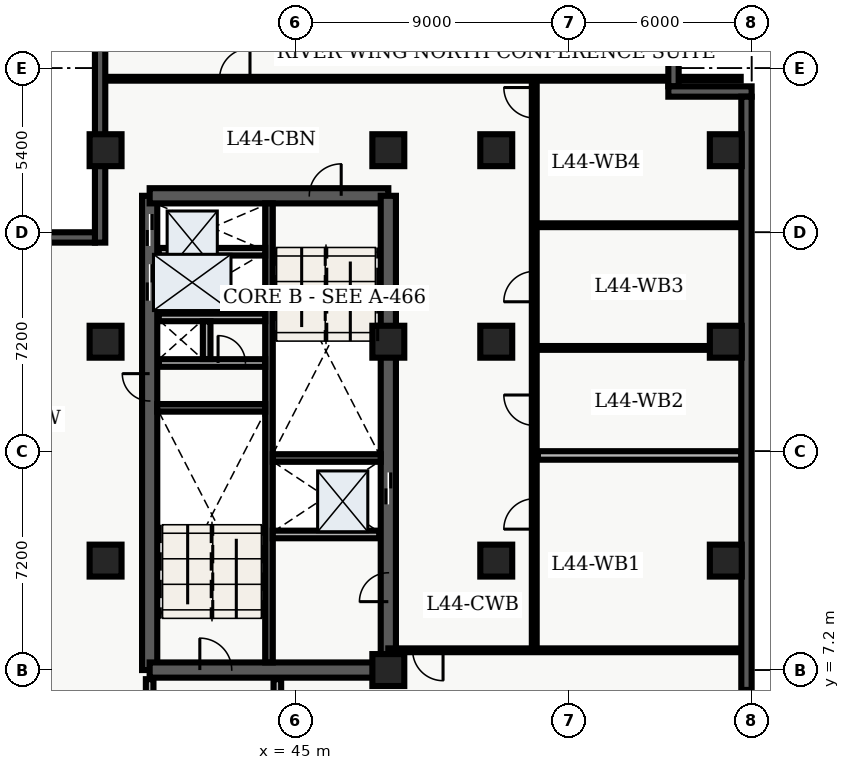
"""IFC4 building model, lengths in metres.
Left out: names, types, materials, properties, quantities, classifications, styles, units other than length and angle.
Written with IfcOpenShell. Run it as: python <this file> out.ifc"""

import sys

from ifc_helpers import new_model, entity, si_unit, converted_unit, direction, frame, origin_with_axes, origin_2d_with_axis, place, context, subcontext, project, spatial, polyline, rectangle, outline, extrude, element, fill, save


model = new_model("IFC4")
c1 = context("Model", 3, precision=1e-05, world=origin_with_axes(), true_north=direction((0.0, 1.0)))
c2 = subcontext(c1, "Body", "Model", "MODEL_VIEW")
j1 = project(units=[si_unit("LENGTHUNIT", "METRE"), converted_unit("PLANEANGLEUNIT", "DEGREE", entity("IfcPlaneAngleMeasure", 0.017), si_unit("PLANEANGLEUNIT", "RADIAN"), dimensions=[0, 0, 0, 0, 0, 0, 0])], contexts=[c1])
p1 = place(None, origin_with_axes())
s1 = spatial("IfcSite", under=j1, at=p1, CompositionType="ELEMENT")
p2 = place(p1, origin_with_axes())
s2 = spatial("IfcBuilding", under=s1, at=p2, CompositionType="ELEMENT")
p3 = place(p2, frame((0.0, 0.0, 179.7), z_axis=(0.0, 0.0, 1.0), x_axis=(1.0, 0.0, 0.0)))
s3 = spatial("IfcBuildingStorey", under=s2, at=p3, CompositionType="ELEMENT", Elevation=179.7)
p4 = place(p3, frame((40.2, 7.2, 0.0), z_axis=(0.0, 0.0, 1.0), x_axis=(0.0, 1.0, 0.0)))
e1 = element("IfcWall", 1, at=p4, inside=s3, PredefinedType="SHEAR", context=c2, shape_type="SweptSolid", body=[
    extrude(outline(polyline([(0.0, -0.25), (15.6, -0.25), (15.6, 0.25), (0.0, 0.25), (0.0, -0.25)])), origin_with_axes(), (0.0, 0.0, 1.0), 3.66),
])
p5 = place(p4, frame((14.475, 0.0, 0.0), z_axis=(0.0, 0.0, 1.0), x_axis=(1.0, 0.0, 0.0)))
e2 = element("IfcOpeningElement", 2, at=p5, cuts=e1, PredefinedType="OPENING", context=c2, shape_type="SweptSolid", body=[
    extrude(rectangle(XDim=1.05, YDim=0.52, at=origin_2d_with_axis()), origin_with_axes(), (0.0, 0.0, 1.0), 2.15),
])
p6 = place(p4, frame((12.75, 0.0, 0.0), z_axis=(0.0, 0.0, 1.0), x_axis=(1.0, 0.0, 0.0)))
e3 = element("IfcOpeningElement", 3, at=p6, cuts=e1, PredefinedType="OPENING", context=c2, shape_type="SweptSolid", body=[
    extrude(rectangle(XDim=1.2, YDim=0.52, at=origin_2d_with_axis()), origin_with_axes(), (0.0, 0.0, 1.0), 2.15),
])
p7 = place(p4, frame((9.3, 0.0, 0.0), z_axis=(0.0, 0.0, 1.0), x_axis=(1.0, 0.0, 0.0)))
e4 = element("IfcOpeningElement", 4, at=p7, cuts=e1, PredefinedType="OPENING", context=c2, shape_type="SweptSolid", body=[
    extrude(rectangle(XDim=0.9, YDim=0.52, at=origin_2d_with_axis()), origin_with_axes(), (0.0, 0.0, 1.0), 2.15),
])
p8 = place(p3, frame((40.2, 7.2, 0.0), z_axis=(0.0, 0.0, 1.0), x_axis=(1.0, 0.0, 0.0)))
e5 = element("IfcWall", 5, at=p8, inside=s3, PredefinedType="SHEAR", context=c2, shape_type="SweptSolid", body=[
    extrude(outline(polyline([(0.0, -0.25), (7.85, -0.25), (7.85, 0.25), (0.0, 0.25), (0.0, -0.25)])), origin_with_axes(), (0.0, 0.0, 1.0), 3.66),
])
p9 = place(p8, frame((2.175, 0.0, 0.0), z_axis=(0.0, 0.0, 1.0), x_axis=(1.0, 0.0, 0.0)))
e6 = element("IfcOpeningElement", 6, at=p9, cuts=e5, PredefinedType="OPENING", context=c2, shape_type="SweptSolid", body=[
    extrude(rectangle(XDim=1.05, YDim=0.52, at=origin_2d_with_axis()), origin_with_axes(), (0.0, 0.0, 1.0), 2.15),
])
p10 = place(p3, frame((40.2, 22.8, 0.0), z_axis=(0.0, 0.0, 1.0), x_axis=(1.0, 0.0, 0.0)))
e7 = element("IfcWall", 7, at=p10, inside=s3, PredefinedType="SHEAR", context=c2, shape_type="SweptSolid", body=[
    extrude(outline(polyline([(0.0, -0.25), (7.85, -0.25), (7.85, 0.25), (0.0, 0.25), (0.0, -0.25)])), origin_with_axes(), (0.0, 0.0, 1.0), 3.66),
])
p11 = place(p10, frame((5.775, 0.0, 0.0), z_axis=(0.0, 0.0, 1.0), x_axis=(1.0, 0.0, 0.0)))
e8 = element("IfcOpeningElement", 8, at=p11, cuts=e7, PredefinedType="OPENING", context=c2, shape_type="SweptSolid", body=[
    extrude(rectangle(XDim=1.05, YDim=0.52, at=origin_2d_with_axis()), origin_with_axes(), (0.0, 0.0, 1.0), 2.15),
])
p12 = place(p3, frame((48.05, 7.2, 0.0), z_axis=(0.0, 0.0, 1.0), x_axis=(0.0, 1.0, 0.0)))
e9 = element("IfcWall", 9, at=p12, inside=s3, PredefinedType="SHEAR", context=c2, shape_type="SweptSolid", body=[
    extrude(outline(polyline([(0.0, -0.25), (15.6, -0.25), (15.6, 0.25), (0.0, 0.25), (0.0, -0.25)])), origin_with_axes(), (0.0, 0.0, 1.0), 3.66),
])
p13 = place(p12, frame((5.975, 0.0, 0.0), z_axis=(0.0, 0.0, 1.0), x_axis=(1.0, 0.0, 0.0)))
e10 = element("IfcOpeningElement", 10, at=p13, cuts=e9, PredefinedType="OPENING", context=c2, shape_type="SweptSolid", body=[
    extrude(rectangle(XDim=1.05, YDim=0.52, at=origin_2d_with_axis()), origin_with_axes(), (0.0, 0.0, 1.0), 2.15),
])
p14 = place(p12, frame((2.725, 0.0, 0.0), z_axis=(0.0, 0.0, 1.0), x_axis=(1.0, 0.0, 0.0)))
e11 = element("IfcOpeningElement", 11, at=p14, cuts=e9, PredefinedType="OPENING", context=c2, shape_type="SweptSolid", body=[
    extrude(rectangle(XDim=0.95, YDim=0.52, at=origin_2d_with_axis()), origin_with_axes(), (0.0, 0.0, 1.0), 2.15),
])
p15 = place(p3, frame((44.125, 7.45, 0.0), z_axis=(0.0, 0.0, 1.0), x_axis=(0.0, 1.0, 0.0)))
e12 = element("IfcWall", 12, at=p15, inside=s3, PredefinedType="SHEAR", context=c2, shape_type="SweptSolid", body=[
    extrude(outline(polyline([(0.0, -0.125), (15.1, -0.125), (15.1, 0.125), (0.0, 0.125), (0.0, -0.125)])), origin_with_axes(), (0.0, 0.0, 1.0), 3.66),
])
for number, where, z_axis, x_axis in (
    (13, (40.45, 15.825, 0.0), (0.0, 0.0, 1.0), (1.0, 0.0, 0.0)),
    (14, (44.25, 14.175, 0.0), (0.0, 0.0, 1.0), (1.0, 0.0, 0.0)),
):
    element("IfcWall", number, at=place(p3, frame(where, z_axis=z_axis, x_axis=x_axis)), inside=s3, PredefinedType="SHEAR", context=c2, shape_type="SweptSolid", body=[
        extrude(outline(polyline([(0.0, -0.125), (3.55, -0.125), (3.55, 0.125), (0.0, 0.125), (0.0, -0.125)])), origin_with_axes(), (0.0, 0.0, 1.0), 3.66),
    ])
p16 = place(p3, frame((40.5, 17.3, 0.0), z_axis=(0.0, 0.0, 1.0), x_axis=(1.0, 0.0, 0.0)))
e15 = element("IfcWall", 15, at=p16, inside=s3, PredefinedType="SOLIDWALL", context=c2, shape_type="SweptSolid", body=[
    extrude(outline(polyline([(0.0, -0.125), (3.5, -0.125), (3.5, 0.125), (0.0, 0.125), (0.0, -0.125)])), origin_with_axes(), (0.0, 0.0, 1.0), 2.7),
])
p17 = place(p16, frame((2.4, 0.0, 0.0), z_axis=(0.0, 0.0, 1.0), x_axis=(1.0, 0.0, 0.0)))
e16 = element("IfcOpeningElement", 16, at=p17, cuts=e15, PredefinedType="OPENING", context=c2, shape_type="SweptSolid", body=[
    extrude(rectangle(XDim=0.9, YDim=0.27, at=origin_2d_with_axis()), origin_with_axes(), (0.0, 0.0, 1.0), 2.15),
])
p18 = place(p3, frame((40.5, 18.8, 0.0), z_axis=(0.0, 0.0, 1.0), x_axis=(1.0, 0.0, 0.0)))
e17 = element("IfcWall", 17, at=p18, inside=s3, PredefinedType="SOLIDWALL", context=c2, shape_type="SweptSolid", body=[
    extrude(outline(polyline([(0.0, -0.125), (3.5, -0.125), (3.5, 0.125), (0.0, 0.125), (0.0, -0.125)])), origin_with_axes(), (0.0, 0.0, 1.0), 2.7),
])
p19 = place(p3, frame((42.075, 17.43, 0.0), z_axis=(0.0, 0.0, 1.0), x_axis=(0.0, 1.0, 0.0)))
e18 = element("IfcWall", 18, at=p19, inside=s3, PredefinedType="SOLIDWALL", context=c2, shape_type="SweptSolid", body=[
    extrude(outline(polyline([(0.0, -0.125), (1.24, -0.125), (1.24, 0.125), (0.0, 0.125), (0.0, -0.125)])), origin_with_axes(), (0.0, 0.0, 1.0), 2.7),
])
p20 = place(p3, frame((40.2, 3.1, 0.0), z_axis=(0.0, 0.0, 1.0), x_axis=(0.0, 1.0, 0.0)))
e19 = element("IfcWall", 19, at=p20, inside=s3, PredefinedType="SOLIDWALL", context=c2, shape_type="SweptSolid", body=[
    extrude(outline(polyline([(0.0, -0.125), (3.8, -0.125), (3.8, 0.125), (0.0, 0.125), (0.0, -0.125)])), origin_with_axes(), (0.0, 0.0, 1.0), 2.7),
])
p21 = place(p20, frame((2.075, 0.0, 0.0), z_axis=(0.0, 0.0, 1.0), x_axis=(1.0, 0.0, 0.0)))
e20 = element("IfcOpeningElement", 20, at=p21, cuts=e19, PredefinedType="OPENING", context=c2, shape_type="SweptSolid", body=[
    extrude(rectangle(XDim=1.05, YDim=0.27, at=origin_2d_with_axis()), origin_with_axes(), (0.0, 0.0, 1.0), 2.15),
])
p22 = place(p3, frame((44.4, 3.1, 0.0), z_axis=(0.0, 0.0, 1.0), x_axis=(0.0, 1.0, 0.0)))
e21 = element("IfcWall", 21, at=p22, inside=s3, PredefinedType="SOLIDWALL", context=c2, shape_type="SweptSolid", body=[
    extrude(outline(polyline([(0.0, -0.125), (3.8, -0.125), (3.8, 0.125), (0.0, 0.125), (0.0, -0.125)])), origin_with_axes(), (0.0, 0.0, 1.0), 2.7),
])
for number, where, z_axis, x_axis in (
    (22, (38.75, 10.8, 0.0), (0.0, 0.0, 1.0), (1.0, 0.0, 0.0)),
    (23, (38.75, 18.0, 0.0), (0.0, 0.0, 1.0), (1.0, 0.0, 0.0)),
    (24, (38.75, 24.3, 0.0), (0.0, 0.0, 1.0), (1.0, 0.0, 0.0)),
    (25, (48.05, 7.2, 0.0), (0.0, 0.0, 1.0), (1.0, 0.0, 0.0)),
    (26, (48.05, 18.0, 0.0), (0.0, 0.0, 1.0), (1.0, 0.0, 0.0)),
    (27, (48.05, 24.3, 0.0), (0.0, 0.0, 1.0), (1.0, 0.0, 0.0)),
    (28, (51.6, 10.8, 0.0), (0.0, 0.0, 1.0), (1.0, 0.0, 0.0)),
    (29, (51.6, 18.0, 0.0), (0.0, 0.0, 1.0), (1.0, 0.0, 0.0)),
    (30, (51.6, 24.3, 0.0), (0.0, 0.0, 1.0), (1.0, 0.0, 0.0)),
    (31, (59.15, 10.8, 0.0), (0.0, 0.0, 1.0), (1.0, 0.0, 0.0)),
    (32, (59.15, 18.0, 0.0), (0.0, 0.0, 1.0), (1.0, 0.0, 0.0)),
    (33, (59.15, 24.3, 0.0), (0.0, 0.0, 1.0), (1.0, 0.0, 0.0)),
):
    element("IfcColumn", number, at=place(p3, frame(where, z_axis=z_axis, x_axis=x_axis)), inside=s3, PredefinedType="COLUMN", context=c2, shape_type="SweptSolid", body=[
        extrude(rectangle(XDim=1.05, YDim=1.05, at=origin_2d_with_axis()), origin_with_axes(), (0.0, 0.0, 1.0), 3.9),
    ])
for number, where, z_axis, x_axis in (
    (34, (40.5, 20.96, 0.0), (0.0, 0.0, 1.0), (1.0, 0.0, 0.0)),
    (35, (44.25, 11.66, 0.0), (0.0, 0.0, 1.0), (1.0, 0.0, 0.0)),
):
    element("IfcWall", number, at=place(p3, frame(where, z_axis=z_axis, x_axis=x_axis)), inside=s3, PredefinedType="SOLIDWALL", context=c2, shape_type="SweptSolid", body=[
        extrude(outline(polyline([(0.0, -0.125), (3.5, -0.125), (3.5, 0.125), (0.0, 0.125), (0.0, -0.125)])), origin_with_axes(), (0.0, 0.0, 1.0), 2.7),
    ])
p23 = place(p3, frame((52.85, 7.85, 0.0), z_axis=(0.0, 0.0, 1.0), x_axis=(0.0, 1.0, 0.0)))
e36 = element("IfcWall", 36, at=p23, inside=s3, PredefinedType="PARTITIONING", context=c2, shape_type="SweptSolid", body=[
    extrude(outline(polyline([(0.0, -0.08), (18.8, -0.08), (18.8, 0.08), (0.0, 0.08), (0.0, -0.08)])), origin_with_axes(), (0.0, 0.0, 1.0), 2.7),
])
p24 = place(p23, frame((4.485, 0.0, 0.0), z_axis=(0.0, 0.0, 1.0), x_axis=(1.0, 0.0, 0.0)))
e37 = element("IfcOpeningElement", 37, at=p24, cuts=e36, PredefinedType="OPENING", context=c2, shape_type="SweptSolid", body=[
    extrude(rectangle(XDim=1.0, YDim=0.18, at=origin_2d_with_axis()), origin_with_axes(), (0.0, 0.0, 1.0), 2.15),
])
p25 = place(p23, frame((7.897, 0.0, 0.0), z_axis=(0.0, 0.0, 1.0), x_axis=(1.0, 0.0, 0.0)))
e38 = element("IfcOpeningElement", 38, at=p25, cuts=e36, PredefinedType="OPENING", context=c2, shape_type="SweptSolid", body=[
    extrude(rectangle(XDim=1.0, YDim=0.18, at=origin_2d_with_axis()), origin_with_axes(), (0.0, 0.0, 1.0), 2.15),
])
p26 = place(p23, frame((11.964, 0.0, 0.0), z_axis=(0.0, 0.0, 1.0), x_axis=(1.0, 0.0, 0.0)))
e39 = element("IfcOpeningElement", 39, at=p26, cuts=e36, PredefinedType="OPENING", context=c2, shape_type="SweptSolid", body=[
    extrude(rectangle(XDim=1.0, YDim=0.18, at=origin_2d_with_axis()), origin_with_axes(), (0.0, 0.0, 1.0), 2.15),
])
p27 = place(p23, frame((18.011, 0.0, 0.0), z_axis=(0.0, 0.0, 1.0), x_axis=(1.0, 0.0, 0.0)))
e40 = element("IfcOpeningElement", 40, at=p27, cuts=e36, PredefinedType="OPENING", context=c2, shape_type="SweptSolid", body=[
    extrude(rectangle(XDim=1.0, YDim=0.18, at=origin_2d_with_axis()), origin_with_axes(), (0.0, 0.0, 1.0), 2.15),
])
p28 = place(p3, frame((59.665, 7.85, 0.0), z_axis=(0.0, 0.0, 1.0), x_axis=(-1.0, 0.0, 0.0)))
e41 = element("IfcWall", 41, at=p28, inside=s3, PredefinedType="PARTITIONING", context=c2, shape_type="SweptSolid", body=[
    extrude(outline(polyline([(0.0, -0.062), (11.615, -0.062), (11.615, 0.062), (0.0, 0.062), (0.0, -0.062)])), origin_with_axes(), (0.0, 0.0, 1.0), 2.7),
])
p29 = place(p28, frame((10.315, 0.0, 0.0), z_axis=(0.0, 0.0, 1.0), x_axis=(1.0, 0.0, 0.0)))
e42 = element("IfcOpeningElement", 42, at=p29, cuts=e41, PredefinedType="OPENING", context=c2, shape_type="SweptSolid", body=[
    extrude(rectangle(XDim=1.0, YDim=0.145, at=origin_2d_with_axis()), origin_with_axes(), (0.0, 0.0, 1.0), 2.15),
])
p30 = place(p3, frame((38.735, 26.65, 0.0), z_axis=(0.0, 0.0, 1.0), x_axis=(1.0, 0.0, 0.0)))
e43 = element("IfcWall", 43, at=p30, inside=s3, PredefinedType="PARTITIONING", context=c2, shape_type="SweptSolid", body=[
    extrude(outline(polyline([(0.0, -0.062), (20.905, -0.062), (20.905, 0.062), (0.0, 0.062), (0.0, -0.062)])), origin_with_axes(), (0.0, 0.0, 1.0), 2.7),
])
p31 = place(p30, frame((4.265, 0.0, 0.0), z_axis=(0.0, 0.0, 1.0), x_axis=(1.0, 0.0, 0.0)))
e44 = element("IfcOpeningElement", 44, at=p31, cuts=e43, PredefinedType="OPENING", context=c2, shape_type="SweptSolid", body=[
    extrude(rectangle(XDim=1.0, YDim=0.145, at=origin_2d_with_axis()), origin_with_axes(), (0.0, 0.0, 1.0), 2.15),
])
p32 = place(p3, frame((52.97, 14.259, 0.0), z_axis=(0.0, 0.0, 1.0), x_axis=(1.0, 0.0, 0.0)))
e45 = element("IfcWall", 45, at=p32, inside=s3, PredefinedType="PARTITIONING", context=c2, shape_type="SweptSolid", body=[
    extrude(outline(polyline([(0.0, -0.14), (6.695, -0.14), (6.695, 0.14), (0.0, 0.14), (0.0, -0.14)])), origin_with_axes(), (0.0, 0.0, 1.0), 2.7),
])
for number, where, z_axis, x_axis in (
    (46, (52.97, 17.796, 0.0), (0.0, 0.0, 1.0), (1.0, 0.0, 0.0)),
    (47, (52.97, 21.832, 0.0), (0.0, 0.0, 1.0), (1.0, 0.0, 0.0)),
):
    element("IfcWall", number, at=place(p3, frame(where, z_axis=z_axis, x_axis=x_axis)), inside=s3, PredefinedType="PARTITIONING", context=c2, shape_type="SweptSolid", body=[
        extrude(outline(polyline([(0.0, -0.062), (6.695, -0.062), (6.695, 0.062), (0.0, 0.062), (0.0, -0.062)])), origin_with_axes(), (0.0, 0.0, 1.0), 2.7),
    ])
p33 = place(p3, frame((38.57, 21.26, 0.0), z_axis=(0.0, 0.0, 1.0), x_axis=(0.0, 1.0, 0.0)))
e48 = element("IfcWall", 48, at=p33, inside=s3, PredefinedType="SOLIDWALL", context=c2, shape_type="SweptSolid", body=[
    extrude(outline(polyline([(0.0, -0.17), (7.54, -0.17), (7.54, 0.17), (0.0, 0.17), (0.0, -0.17)])), origin_with_axes(), (0.0, 0.0, 1.0), 3.66),
])
p34 = place(p3, frame((57.43, 28.46, 0.0), z_axis=(0.0, 0.0, 1.0), x_axis=(0.0, -1.0, 0.0)))
e49 = element("IfcWall", 49, at=p34, inside=s3, PredefinedType="SOLIDWALL", context=c2, shape_type="SweptSolid", body=[
    extrude(outline(polyline([(0.0, -0.17), (2.06, -0.17), (2.06, 0.17), (0.0, 0.17), (0.0, -0.17)])), origin_with_axes(), (0.0, 0.0, 1.0), 3.66),
])
p35 = place(p3, frame((57.26, 26.23, 0.0), z_axis=(0.0, 0.0, 1.0), x_axis=(1.0, 0.0, 0.0)))
e50 = element("IfcWall", 50, at=p35, inside=s3, PredefinedType="SOLIDWALL", context=c2, shape_type="SweptSolid", body=[
    extrude(outline(polyline([(0.0, -0.17), (2.74, -0.17), (2.74, 0.17), (0.0, 0.17), (0.0, -0.17)])), origin_with_axes(), (0.0, 0.0, 1.0), 3.66),
])
p36 = place(p3, frame((59.83, 26.06, 0.0), z_axis=(0.0, 0.0, 1.0), x_axis=(0.0, -1.0, 0.0)))
e51 = element("IfcWall", 51, at=p36, inside=s3, PredefinedType="SOLIDWALL", context=c2, shape_type="SweptSolid", body=[
    extrude(outline(polyline([(0.0, -0.17), (23.66, -0.17), (23.66, 0.17), (0.0, 0.17), (0.0, -0.17)])), origin_with_axes(), (0.0, 0.0, 1.0), 3.66),
])
p37 = place(p36, frame((20.364, 0.0, 0.45), z_axis=(0.0, 0.0, 1.0), x_axis=(1.0, 0.0, 0.0)))
e52 = element("IfcOpeningElement", 52, at=p37, cuts=e51, PredefinedType="OPENING", context=c2, shape_type="SweptSolid", body=[
    extrude(rectangle(XDim=1.8, YDim=0.36, at=origin_2d_with_axis()), origin_with_axes(), (0.0, 0.0, 1.0), 2.1),
])
p38 = place(p3, frame((25.465, 21.43, 0.0), z_axis=(0.0, 0.0, 1.0), x_axis=(1.0, 0.0, 0.0)))
e53 = element("IfcWall", 53, at=p38, inside=s3, PredefinedType="SOLIDWALL", context=c2, shape_type="SweptSolid", body=[
    extrude(outline(polyline([(0.0, -0.17), (12.935, -0.17), (12.935, 0.17), (0.0, 0.17), (0.0, -0.17)])), origin_with_axes(), (0.0, 0.0, 1.0), 3.66),
])
p39 = place(p38, frame((3.534, 0.0, 0.45), z_axis=(0.0, 0.0, 1.0), x_axis=(1.0, 0.0, 0.0)))
e54 = element("IfcOpeningElement", 54, at=p39, cuts=e53, PredefinedType="OPENING", context=c2, shape_type="SweptSolid", body=[
    extrude(rectangle(XDim=1.8, YDim=0.36, at=origin_2d_with_axis()), origin_with_axes(), (0.0, 0.0, 1.0), 2.1),
])
p40 = place(p38, frame((9.401, 0.0, 0.45), z_axis=(0.0, 0.0, 1.0), x_axis=(1.0, 0.0, 0.0)))
e55 = element("IfcOpeningElement", 55, at=p40, cuts=e53, PredefinedType="OPENING", context=c2, shape_type="SweptSolid", body=[
    extrude(rectangle(XDim=1.8, YDim=0.36, at=origin_2d_with_axis()), origin_with_axes(), (0.0, 0.0, 1.0), 2.1),
])
p41 = place(p12, frame((5.975, 0.0, 0.0), z_axis=(0.0, 0.0, 1.0), x_axis=(1.0, 0.0, 0.0)))
e56 = element("IfcDoor", 56, at=p41, inside=s3, OperationType="SLIDING_TO_LEFT", PredefinedType="DOOR", context=c2, shape_type="SweptSolid", body=[
    extrude(rectangle(XDim=1.05, YDim=0.09, at=origin_2d_with_axis()), origin_with_axes(), (0.0, 0.0, 1.0), 2.15),
])
fill(e10, e56)
p42 = place(p4, frame((14.475, 0.0, 0.0), z_axis=(0.0, 0.0, 1.0), x_axis=(1.0, 0.0, 0.0)))
e57 = element("IfcDoor", 57, at=p42, inside=s3, OperationType="SLIDING_TO_RIGHT", PredefinedType="DOOR", context=c2, shape_type="SweptSolid", body=[
    extrude(rectangle(XDim=1.05, YDim=0.09, at=origin_2d_with_axis()), origin_with_axes(), (0.0, 0.0, 1.0), 2.15),
])
fill(e2, e57)
p43 = place(p4, frame((12.75, 0.0, 0.0), z_axis=(0.0, 0.0, 1.0), x_axis=(1.0, 0.0, 0.0)))
e58 = element("IfcDoor", 58, at=p43, inside=s3, OperationType="DOUBLE_DOOR_SLIDING", PredefinedType="DOOR", context=c2, shape_type="SweptSolid", body=[
    extrude(rectangle(XDim=1.2, YDim=0.09, at=origin_2d_with_axis()), origin_with_axes(), (0.0, 0.0, 1.0), 2.15),
])
fill(e3, e58)
p44 = place(p4, frame((9.3, 0.0, 0.0), z_axis=(0.0, 0.0, 1.0), x_axis=(1.0, 0.0, 0.0)))
e59 = element("IfcDoor", 59, at=p44, inside=s3, OperationType="SINGLE_SWING_RIGHT", PredefinedType="DOOR", context=c2, shape_type="SweptSolid", body=[
    extrude(rectangle(XDim=0.9, YDim=0.09, at=origin_2d_with_axis()), origin_with_axes(), (0.0, 0.0, 1.0), 2.15),
])
fill(e4, e59)
p45 = place(p16, frame((2.4, 0.0, 0.0), z_axis=(0.0, 0.0, 1.0), x_axis=(1.0, 0.0, 0.0)))
e60 = element("IfcDoor", 60, at=p45, inside=s3, OperationType="SINGLE_SWING_LEFT", PredefinedType="DOOR", context=c2, shape_type="SweptSolid", body=[
    extrude(rectangle(XDim=0.9, YDim=0.09, at=origin_2d_with_axis()), origin_with_axes(), (0.0, 0.0, 1.0), 2.15),
])
fill(e16, e60)
p46 = place(p8, frame((2.175, 0.0, 0.0), z_axis=(0.0, 0.0, 1.0), x_axis=(1.0, 0.0, 0.0)))
e61 = element("IfcDoor", 61, at=p46, inside=s3, OperationType="SINGLE_SWING_LEFT", PredefinedType="DOOR", context=c2, shape_type="SweptSolid", body=[
    extrude(rectangle(XDim=1.05, YDim=0.09, at=origin_2d_with_axis()), origin_with_axes(), (0.0, 0.0, 1.0), 2.15),
])
fill(e6, e61)
p47 = place(p10, frame((5.775, 0.0, 0.0), z_axis=(0.0, 0.0, 1.0), x_axis=(1.0, 0.0, 0.0)))
e62 = element("IfcDoor", 62, at=p47, inside=s3, OperationType="SINGLE_SWING_RIGHT", PredefinedType="DOOR", context=c2, shape_type="SweptSolid", body=[
    extrude(rectangle(XDim=1.05, YDim=0.09, at=origin_2d_with_axis()), origin_with_axes(), (0.0, 0.0, 1.0), 2.15),
])
fill(e8, e62)
p48 = place(p12, frame((2.725, 0.0, 0.0), z_axis=(0.0, 0.0, 1.0), x_axis=(1.0, 0.0, 0.0)))
e63 = element("IfcDoor", 63, at=p48, inside=s3, OperationType="SINGLE_SWING_LEFT", PredefinedType="DOOR", context=c2, shape_type="SweptSolid", body=[
    extrude(rectangle(XDim=0.95, YDim=0.09, at=origin_2d_with_axis()), origin_with_axes(), (0.0, 0.0, 1.0), 2.15),
])
fill(e11, e63)
p49 = place(p28, frame((10.315, 0.0, 0.0), z_axis=(0.0, 0.0, 1.0), x_axis=(1.0, 0.0, 0.0)))
e64 = element("IfcDoor", 64, at=p49, inside=s3, OperationType="SINGLE_SWING_LEFT", PredefinedType="DOOR", context=c2, shape_type="SweptSolid", body=[
    extrude(rectangle(XDim=1.0, YDim=0.075, at=origin_2d_with_axis()), origin_with_axes(), (0.0, 0.0, 1.0), 2.15),
])
fill(e42, e64)
p50 = place(p30, frame((4.265, 0.0, 0.0), z_axis=(0.0, 0.0, 1.0), x_axis=(1.0, 0.0, 0.0)))
e65 = element("IfcDoor", 65, at=p50, inside=s3, OperationType="SINGLE_SWING_RIGHT", PredefinedType="DOOR", context=c2, shape_type="SweptSolid", body=[
    extrude(rectangle(XDim=1.0, YDim=0.075, at=origin_2d_with_axis()), origin_with_axes(), (0.0, 0.0, 1.0), 2.15),
])
fill(e44, e65)
p51 = place(p23, frame((4.485, 0.0, 0.0), z_axis=(0.0, 0.0, 1.0), x_axis=(1.0, 0.0, 0.0)))
e66 = element("IfcDoor", 66, at=p51, inside=s3, OperationType="SINGLE_SWING_LEFT", PredefinedType="DOOR", context=c2, shape_type="SweptSolid", body=[
    extrude(rectangle(XDim=1.0, YDim=0.09, at=origin_2d_with_axis()), origin_with_axes(), (0.0, 0.0, 1.0), 2.15),
])
fill(e37, e66)
p52 = place(p23, frame((7.897, 0.0, 0.0), z_axis=(0.0, 0.0, 1.0), x_axis=(1.0, 0.0, 0.0)))
e67 = element("IfcDoor", 67, at=p52, inside=s3, OperationType="SINGLE_SWING_RIGHT", PredefinedType="DOOR", context=c2, shape_type="SweptSolid", body=[
    extrude(rectangle(XDim=1.0, YDim=0.09, at=origin_2d_with_axis()), origin_with_axes(), (0.0, 0.0, 1.0), 2.15),
])
fill(e38, e67)
p53 = place(p23, frame((11.964, 0.0, 0.0), z_axis=(0.0, 0.0, 1.0), x_axis=(1.0, 0.0, 0.0)))
e68 = element("IfcDoor", 68, at=p53, inside=s3, OperationType="SINGLE_SWING_LEFT", PredefinedType="DOOR", context=c2, shape_type="SweptSolid", body=[
    extrude(rectangle(XDim=1.0, YDim=0.09, at=origin_2d_with_axis()), origin_with_axes(), (0.0, 0.0, 1.0), 2.15),
])
fill(e39, e68)
p54 = place(p23, frame((18.011, 0.0, 0.0), z_axis=(0.0, 0.0, 1.0), x_axis=(1.0, 0.0, 0.0)))
e69 = element("IfcDoor", 69, at=p54, inside=s3, OperationType="SINGLE_SWING_RIGHT", PredefinedType="DOOR", context=c2, shape_type="SweptSolid", body=[
    extrude(rectangle(XDim=1.0, YDim=0.09, at=origin_2d_with_axis()), origin_with_axes(), (0.0, 0.0, 1.0), 2.15),
])
fill(e40, e69)
p55 = place(p36, frame((20.364, 0.0, 0.45), z_axis=(0.0, 0.0, 1.0), x_axis=(1.0, 0.0, 0.0)))
e70 = element("IfcWindow", 70, at=p55, inside=s3, PredefinedType="WINDOW", context=c2, shape_type="SweptSolid", body=[
    extrude(rectangle(XDim=1.8, YDim=0.09, at=origin_2d_with_axis()), origin_with_axes(), (0.0, 0.0, 1.0), 2.1),
])
fill(e52, e70)
save(model, sys.argv[1])
